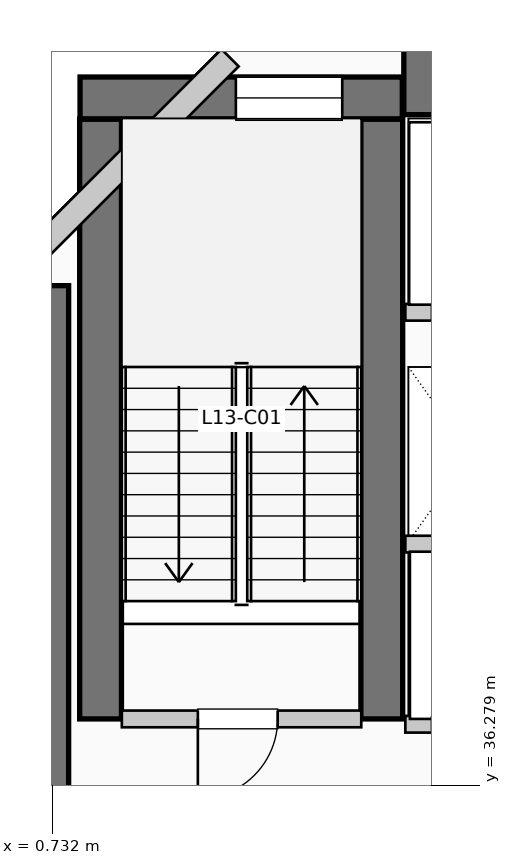
"""IFC4 building model, lengths in metres.
Left out: names, types, materials, properties, quantities, classifications, styles, units other than length and angle.
Written with IfcOpenShell. Run it as: python <this file> out.ifc"""

import sys

from ifc_helpers import new_model, si_unit, direction, frame, frame_2d, origin, place, context, subcontext, project, spatial, rectangle, extrude, element, fill, save


model = new_model("IFC4")
c1 = context("Model", 3, precision=1e-05, world=origin(), true_north=direction((0.0, 1.0)))
c2 = subcontext(c1, "Body", "Model", "MODEL_VIEW")
j1 = project(units=[si_unit("LENGTHUNIT", "METRE"), si_unit("PLANEANGLEUNIT", "RADIAN")], contexts=[c1])
p1 = place(None, origin())
s1 = spatial("IfcSite", under=j1, at=p1, CompositionType="ELEMENT")
p2 = place(p1, origin())
s2 = spatial("IfcBuilding", under=s1, at=p2, CompositionType="ELEMENT")
p3 = place(p2, frame((0.0, 0.0, 58.08)))
s3 = spatial("IfcBuildingStorey", under=s2, at=p3, CompositionType="ELEMENT", Elevation=58.08)
p4 = place(p3, frame((5.36, 45.55, 0.0), z_axis=(0.0, 0.0, 1.0), x_axis=(1.0, 0.0, 0.0)))
e1 = element("IfcWall", 1, at=p4, inside=s3, PredefinedType="SHEAR", context=c2, shape_type="SweptSolid", body=[
    extrude(rectangle(XDim=13.98, YDim=0.9, at=frame_2d((6.99, 0.0))), origin(), (0.0, 0.0, 1.0), 3.96),
])
p5 = place(p3, frame((0.5, 34.95, 0.0), z_axis=(0.0, 0.0, 1.0), x_axis=(0.0, 1.0, 0.0)))
e2 = element("IfcWall", 2, at=p5, inside=s3, PredefinedType="SHEAR", context=c2, shape_type="SweptSolid", body=[
    extrude(rectangle(XDim=7.9, YDim=0.9, at=frame_2d((3.95, 0.0))), origin(), (0.0, 0.0, 1.0), 3.96),
])
for number, where, z_axis, x_axis in (
    (3, (1.37, 37.15, 0.0), (0.0, 0.0, 1.0), (0.0, 1.0, 0.0)),
    (4, (5.07, 37.15, 0.0), (0.0, 0.0, 1.0), (0.0, 1.0, 0.0)),
):
    element("IfcWall", number, at=place(p3, frame(where, z_axis=z_axis, x_axis=x_axis)), inside=s3, PredefinedType="SHEAR", context=c2, shape_type="SweptSolid", body=[
        extrude(rectangle(XDim=7.89, YDim=0.55, at=frame_2d((3.945, 0.0))), origin(), (0.0, 0.0, 1.0), 3.96),
    ])
p6 = place(p3, frame((1.1, 45.32, 0.0), z_axis=(0.0, 0.0, 1.0), x_axis=(1.0, 0.0, 0.0)))
e5 = element("IfcWall", 5, at=p6, inside=s3, PredefinedType="SHEAR", context=c2, shape_type="SweptSolid", body=[
    extrude(rectangle(XDim=4.24, YDim=0.55, at=frame_2d((2.12, 0.0))), origin(), (0.0, 0.0, 1.0), 3.96),
])
p7 = place(p6, frame((2.05, 0.0, 1.05)))
e6 = element("IfcOpeningElement", 6, at=p7, cuts=e5, PredefinedType="OPENING", context=c2, shape_type="SweptSolid", body=[
    extrude(rectangle(XDim=1.4, YDim=1.8, at=frame_2d((0.7, 0.9))), frame((0.0, 0.285, 0.0), z_axis=(0.0, -1.0, 0.0), x_axis=(1.0, 0.0, 0.0)), (0.0, 0.0, 1.0), 0.57),
])
p8 = place(p3, frame((3.074, 45.848, 0.0), z_axis=(0.0, 0.0, 1.0), x_axis=(-0.707106781187, -0.707106781187, 0.0)))
e7 = element("IfcWall", 7, at=p8, inside=s3, PredefinedType="SOLIDWALL", context=c2, shape_type="SweptSolid", body=[
    extrude(rectangle(XDim=4.133, YDim=0.32, at=frame_2d((2.066, 0.0))), origin(), (0.0, 0.0, 1.0), 3.71),
])
p9 = place(p3, frame((1.65, 37.15, 0.0), z_axis=(0.0, 0.0, 1.0), x_axis=(1.0, 0.0, 0.0)))
e8 = element("IfcWall", 8, at=p9, inside=s3, PredefinedType="PARTITIONING", context=c2, shape_type="SweptSolid", body=[
    extrude(rectangle(XDim=3.15, YDim=0.22, at=frame_2d((1.575, 0.0))), origin(), (0.0, 0.0, 1.0), 3.71),
])
p10 = place(p9, frame((2.05, 0.0, 0.0), z_axis=(0.0, 0.0, 1.0), x_axis=(-1.0, 0.0, 0.0)))
e9 = element("IfcOpeningElement", 9, at=p10, cuts=e8, PredefinedType="OPENING", context=c2, shape_type="SweptSolid", body=[
    extrude(rectangle(XDim=1.05, YDim=2.15, at=frame_2d((0.525, 1.075))), frame((0.0, 0.12, 0.0), z_axis=(0.0, -1.0, 0.0), x_axis=(1.0, 0.0, 0.0)), (0.0, 0.0, 1.0), 0.24),
])
p11 = place(p3, frame((5.38, 37.08, 0.0), z_axis=(0.0, 0.0, 1.0), x_axis=(1.0, 0.0, 0.0)))
e10 = element("IfcWall", 10, at=p11, inside=s3, PredefinedType="PARTITIONING", context=c2, shape_type="SweptSolid", body=[
    extrude(rectangle(XDim=3.46, YDim=0.22, at=frame_2d((1.73, 0.0))), origin(), (0.0, 0.0, 1.0), 3.71),
])
p12 = place(p11, frame((1.55, 0.0, 0.0), z_axis=(0.0, 0.0, 1.0), x_axis=(-1.0, 0.0, 0.0)))
e11 = element("IfcOpeningElement", 11, at=p12, cuts=e10, PredefinedType="OPENING", context=c2, shape_type="SweptSolid", body=[
    extrude(rectangle(XDim=1.2, YDim=2.2, at=frame_2d((0.6, 1.1))), frame((0.0, 0.12, 0.0), z_axis=(0.0, -1.0, 0.0), x_axis=(1.0, 0.0, 0.0)), (0.0, 0.0, 1.0), 0.24),
])
p13 = place(p11, frame((3.22, 0.0, 0.0), z_axis=(0.0, 0.0, 1.0), x_axis=(-1.0, 0.0, 0.0)))
e12 = element("IfcOpeningElement", 12, at=p13, cuts=e10, PredefinedType="OPENING", context=c2, shape_type="SweptSolid", body=[
    extrude(rectangle(XDim=1.2, YDim=2.2, at=frame_2d((0.6, 1.1))), frame((0.0, 0.12, 0.0), z_axis=(0.0, -1.0, 0.0), x_axis=(1.0, 0.0, 0.0)), (0.0, 0.0, 1.0), 0.24),
])
p14 = place(p3, frame((5.38, 39.45, 0.0), z_axis=(0.0, 0.0, 1.0), x_axis=(1.0, 0.0, 0.0)))
e13 = element("IfcWall", 13, at=p14, inside=s3, PredefinedType="PARTITIONING", context=c2, shape_type="SweptSolid", body=[
    extrude(rectangle(XDim=3.46, YDim=0.22, at=frame_2d((1.73, 0.0))), origin(), (0.0, 0.0, 1.0), 3.71),
])
p15 = place(p3, frame((5.38, 42.5, 0.0), z_axis=(0.0, 0.0, 1.0), x_axis=(1.0, 0.0, 0.0)))
e14 = element("IfcWall", 14, at=p15, inside=s3, PredefinedType="PARTITIONING", context=c2, shape_type="SweptSolid", body=[
    extrude(rectangle(XDim=3.77, YDim=0.22, at=frame_2d((1.885, 0.0))), origin(), (0.0, 0.0, 1.0), 3.71),
])
p16 = place(p15, frame((1.75, 0.0, 0.0), z_axis=(0.0, 0.0, 1.0), x_axis=(-1.0, 0.0, 0.0)))
e15 = element("IfcOpeningElement", 15, at=p16, cuts=e14, PredefinedType="OPENING", context=c2, shape_type="SweptSolid", body=[
    extrude(rectangle(XDim=1.4, YDim=2.2, at=frame_2d((0.7, 1.1))), frame((0.0, 0.12, 0.0), z_axis=(0.0, -1.0, 0.0), x_axis=(1.0, 0.0, 0.0)), (0.0, 0.0, 1.0), 0.24),
])
p17 = place(p15, frame((3.53, 0.0, 0.0), z_axis=(0.0, 0.0, 1.0), x_axis=(-1.0, 0.0, 0.0)))
e16 = element("IfcOpeningElement", 16, at=p17, cuts=e14, PredefinedType="OPENING", context=c2, shape_type="SweptSolid", body=[
    extrude(rectangle(XDim=1.4, YDim=2.2, at=frame_2d((0.7, 1.1))), frame((0.0, 0.12, 0.0), z_axis=(0.0, -1.0, 0.0), x_axis=(1.0, 0.0, 0.0)), (0.0, 0.0, 1.0), 0.24),
])
p18 = place(p7, origin())
e17 = element("IfcWindow", 17, at=p18, inside=s3, PartitioningType="SINGLE_PANEL", PredefinedType="WINDOW", context=c2, shape_type="SweptSolid", body=[
    extrude(rectangle(XDim=1.4, YDim=1.8, at=frame_2d((0.7, 0.9))), frame((0.0, 0.03, 0.0), z_axis=(0.0, -1.0, 0.0), x_axis=(1.0, 0.0, 0.0)), (0.0, 0.0, 1.0), 0.06),
])
fill(e6, e17)
p19 = place(p10, origin())
e18 = element("IfcDoor", 18, at=p19, inside=s3, OperationType="SINGLE_SWING_LEFT", PredefinedType="DOOR", context=c2, shape_type="SweptSolid", body=[
    extrude(rectangle(XDim=1.05, YDim=2.15, at=frame_2d((0.525, 1.075))), frame((0.0, 0.025, 0.0), z_axis=(0.0, -1.0, 0.0), x_axis=(1.0, 0.0, 0.0)), (0.0, 0.0, 1.0), 0.05),
])
fill(e9, e18)
save(model, sys.argv[1])
